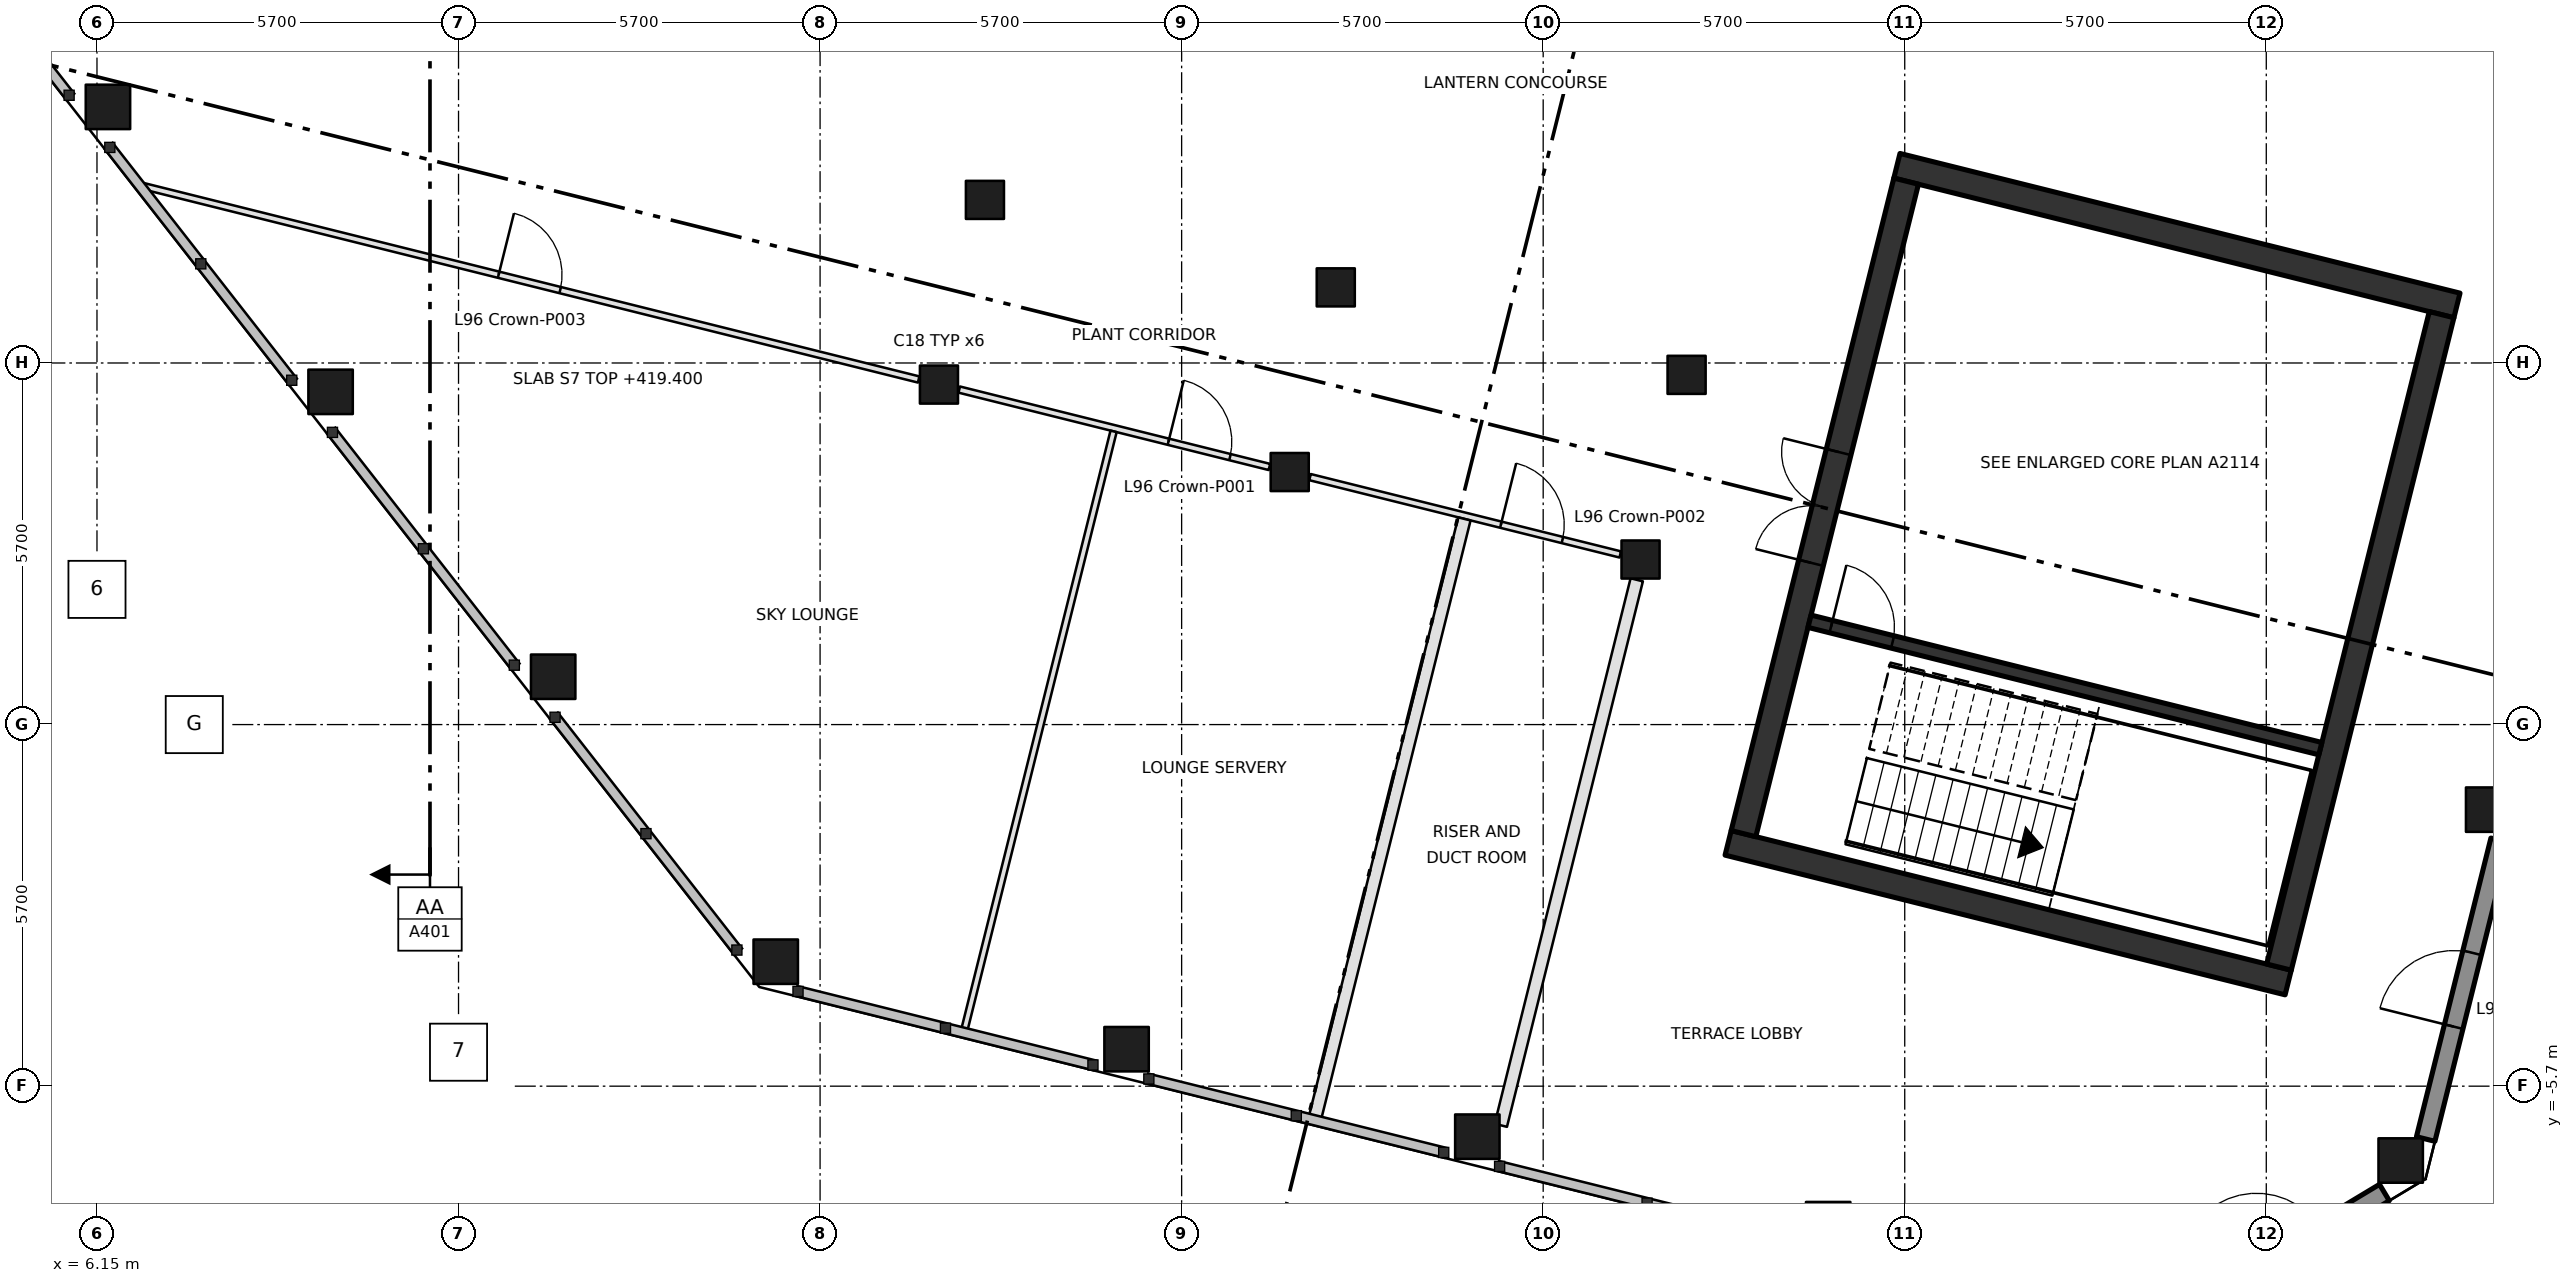
"""IFC4 building model, lengths in metres.
Left out: names, types, materials, properties, quantities, classifications, styles, units other than length and angle.
Written with IfcOpenShell. Run it as: python <this file> out.ifc"""

import sys

from ifc_helpers import new_model, si_unit, direction, frame, frame_2d, origin, origin_2d, place, context, subcontext, project, spatial, rectangle, extrude, element, fill, save


model = new_model("IFC4")
c1 = context("Model", 3, precision=1e-05, world=origin(), true_north=direction((0.0, 1.0)))
c2 = subcontext(c1, "Body", "Model", "MODEL_VIEW")
j1 = project(units=[si_unit("LENGTHUNIT", "METRE"), si_unit("PLANEANGLEUNIT", "RADIAN")], contexts=[c1])
p1 = place(None, origin())
s1 = spatial("IfcSite", under=j1, at=p1, CompositionType="ELEMENT")
p2 = place(p1, origin())
s2 = spatial("IfcBuilding", under=s1, at=p2, CompositionType="ELEMENT")
p3 = place(p2, frame((0.0, 0.0, 419.4)))
s3 = spatial("IfcBuildingStorey", under=s2, at=p3, CompositionType="ELEMENT", Elevation=419.4)
for number, where, z_axis, x_axis in (
    (1, (16.851, -3.738, 0.0), (0.0, 0.0, 1.0), (1.0, 0.0, 0.0)),
    (2, (13.342, 0.754, 0.0), (0.0, 0.0, 1.0), (1.0, 0.0, 0.0)),
    (3, (9.833, 5.245, 0.0), (0.0, 0.0, 1.0), (1.0, 0.0, 0.0)),
    (4, (6.323, 9.737, 0.0), (0.0, 0.0, 1.0), (1.0, 0.0, 0.0)),
    (5, (22.382, -5.117, 0.0), (0.0, 0.0, 1.0), (1.0, 0.0, 0.0)),
    (6, (27.912, -6.496, 0.0), (0.0, 0.0, 1.0), (1.0, 0.0, 0.0)),
    (7, (33.443, -7.875, 0.0), (0.0, 0.0, 1.0), (1.0, 0.0, 0.0)),
    (8, (42.469, -6.872, 0.0), (0.0, 0.0, 1.0), (1.0, 0.0, 0.0)),
    (9, (43.848, -1.341, 0.0), (0.0, 0.0, 1.0), (1.0, 0.0, 0.0)),
):
    element("IfcColumn", number, at=place(p3, frame(where, z_axis=z_axis, x_axis=x_axis)), inside=s3, PredefinedType="COLUMN", context=c2, shape_type="SweptSolid", body=[
        extrude(rectangle(XDim=0.7, YDim=0.7, at=origin_2d()), origin(), (0.0, 0.0, 1.0), 4.8),
    ])
for number, where, z_axis, x_axis in (
    (10, (19.424, 5.36, 0.0), (0.0, 0.0, 1.0), (1.0, 0.0, 0.0)),
    (11, (24.954, 3.981, 0.0), (0.0, 0.0, 1.0), (1.0, 0.0, 0.0)),
    (12, (30.485, 2.602, 0.0), (0.0, 0.0, 1.0), (1.0, 0.0, 0.0)),
    (13, (20.149, 8.271, 0.0), (0.0, 0.0, 1.0), (1.0, 0.0, 0.0)),
    (14, (25.68, 6.892, 0.0), (0.0, 0.0, 1.0), (1.0, 0.0, 0.0)),
    (15, (31.211, 5.513, 0.0), (0.0, 0.0, 1.0), (1.0, 0.0, 0.0)),
):
    element("IfcColumn", number, at=place(p3, frame(where, z_axis=z_axis, x_axis=x_axis)), inside=s3, PredefinedType="COLUMN", context=c2, shape_type="SweptSolid", body=[
        extrude(rectangle(XDim=0.6, YDim=0.6, at=origin_2d()), origin(), (0.0, 0.0, 1.0), 4.8),
    ])
p4 = place(p3, frame((31.866, -1.864, -0.45), z_axis=(0.0, 0.0, 1.0), x_axis=(0.970281225948, -0.241980045814, 0.0)))
e16 = element("IfcWall", 16, at=p4, inside=s3, PredefinedType="SHEAR", context=c2, shape_type="SweptSolid", body=[
    extrude(rectangle(XDim=9.1, YDim=0.4, at=frame_2d((4.55, 0.0))), origin(), (0.0, 0.0, 1.0), 4.95),
])
p5 = place(p3, frame((34.527, 8.809, -0.45), z_axis=(0.0, 0.0, 1.0), x_axis=(0.970273354879, -0.242011604707, 0.0)))
e17 = element("IfcWall", 17, at=p5, inside=s3, PredefinedType="SHEAR", context=c2, shape_type="SweptSolid", body=[
    extrude(rectangle(XDim=9.099, YDim=0.4, at=frame_2d((4.55, 0.0))), origin(), (0.0, 0.0, 1.0), 4.95),
])
p6 = place(p3, frame((32.108, -1.719, -0.45), z_axis=(0.0, 0.0, 1.0), x_axis=(0.241912337509, 0.970298109326, 0.0)))
e18 = element("IfcWall", 18, at=p6, inside=s3, PredefinedType="SHEAR", context=c2, shape_type="SweptSolid", body=[
    extrude(rectangle(XDim=10.6, YDim=0.4, at=frame_2d((5.3, 0.0))), origin(), (0.0, 0.0, 1.0), 4.95),
])
p7 = place(p6, frame((4.4, 0.0, 0.45)))
e19 = element("IfcOpeningElement", 19, at=p7, cuts=e18, PredefinedType="OPENING", context=c2, shape_type="SweptSolid", body=[
    extrude(rectangle(XDim=1.8, YDim=2.1, at=frame_2d((0.9, 1.05))), frame((0.0, 0.21, 0.0), z_axis=(0.0, -1.0, 0.0), x_axis=(1.0, 0.0, 0.0)), (0.0, 0.0, 1.0), 0.42),
])
p8 = place(p3, frame((40.55, -3.823, -0.45), z_axis=(0.0, 0.0, 1.0), x_axis=(0.241890652548, 0.970303515509, 0.0)))
e20 = element("IfcWall", 20, at=p8, inside=s3, PredefinedType="SHEAR", context=c2, shape_type="SweptSolid", body=[
    extrude(rectangle(XDim=10.6, YDim=0.4, at=frame_2d((5.3, 0.0))), origin(), (0.0, 0.0, 1.0), 4.95),
])
p9 = place(p3, frame((33.149, 1.629, 0.0), z_axis=(0.0, 0.0, 1.0), x_axis=(0.970296307498, -0.241919564434, 0.0)))
e21 = element("IfcWall", 21, at=p9, inside=s3, PredefinedType="SOLIDWALL", context=c2, shape_type="SweptSolid", body=[
    extrude(rectangle(XDim=8.3, YDim=0.2, at=frame_2d((4.15, 0.0))), origin(), (0.0, 0.0, 1.0), 4.5),
])
p10 = place(p9, frame((0.35, 0.0, 0.0)))
e22 = element("IfcOpeningElement", 22, at=p10, cuts=e21, PredefinedType="OPENING", context=c2, shape_type="SweptSolid", body=[
    extrude(rectangle(XDim=1.0, YDim=2.1, at=frame_2d((0.5, 1.05))), frame((0.0, 0.11, 0.0), z_axis=(0.0, -1.0, 0.0), x_axis=(1.0, 0.0, 0.0)), (0.0, 0.0, 1.0), 0.22),
])
p11 = place(p3, frame((6.82, 8.503, 0.0), z_axis=(0.0, 0.0, 1.0), x_axis=(0.970288651432, -0.241950269482, 0.0)))
e23 = element("IfcWall", 23, at=p11, inside=s3, PredefinedType="PARTITIONING", context=c2, shape_type="SweptSolid", body=[
    extrude(rectangle(XDim=12.661, YDim=0.1, at=frame_2d((6.33, 0.0))), origin(), (0.0, 0.0, 1.0), 4.5),
])
p12 = place(p11, frame((5.836, 0.0, 0.0)))
e24 = element("IfcOpeningElement", 24, at=p12, cuts=e23, PredefinedType="OPENING", context=c2, shape_type="SweptSolid", body=[
    extrude(rectangle(XDim=1.0, YDim=2.1, at=frame_2d((0.5, 1.05))), frame((0.0, 0.06, 0.0), z_axis=(0.0, -1.0, 0.0), x_axis=(1.0, 0.0, 0.0)), (0.0, 0.0, 1.0), 0.12),
])
p13 = place(p3, frame((19.744, 5.281, 0.0), z_axis=(0.0, 0.0, 1.0), x_axis=(0.970262058426, -0.242056889963, 0.0)))
e25 = element("IfcWall", 25, at=p13, inside=s3, PredefinedType="PARTITIONING", context=c2, shape_type="SweptSolid", body=[
    extrude(rectangle(XDim=5.04, YDim=0.1, at=frame_2d((2.52, 0.0))), origin(), (0.0, 0.0, 1.0), 4.5),
])
p14 = place(p13, frame((3.399, 0.0, 0.0)))
e26 = element("IfcOpeningElement", 26, at=p14, cuts=e25, PredefinedType="OPENING", context=c2, shape_type="SweptSolid", body=[
    extrude(rectangle(XDim=1.0, YDim=2.1, at=frame_2d((0.5, 1.05))), frame((0.0, 0.06, 0.0), z_axis=(0.0, -1.0, 0.0), x_axis=(1.0, 0.0, 0.0)), (0.0, 0.0, 1.0), 0.12),
])
p15 = place(p3, frame((25.274, 3.901, 0.0), z_axis=(0.0, 0.0, 1.0), x_axis=(0.970318883063, -0.241828999857, 0.0)))
e27 = element("IfcWall", 27, at=p15, inside=s3, PredefinedType="PARTITIONING", context=c2, shape_type="SweptSolid", body=[
    extrude(rectangle(XDim=5.041, YDim=0.1, at=frame_2d((2.521, 0.0))), origin(), (0.0, 0.0, 1.0), 4.5),
])
p16 = place(p15, frame((3.101, 0.0, 0.0)))
e28 = element("IfcOpeningElement", 28, at=p16, cuts=e27, PredefinedType="OPENING", context=c2, shape_type="SweptSolid", body=[
    extrude(rectangle(XDim=1.0, YDim=2.1, at=frame_2d((0.5, 1.05))), frame((0.0, 0.06, 0.0), z_axis=(0.0, -1.0, 0.0), x_axis=(1.0, 0.0, 0.0)), (0.0, 0.0, 1.0), 0.12),
])
p17 = place(p3, frame((30.425, 2.282, 0.0), z_axis=(0.0, 0.0, 1.0), x_axis=(-0.241828998562, -0.970318883385, 0.0)))
e29 = element("IfcWall", 29, at=p17, inside=s3, PredefinedType="PARTITIONING", context=c2, shape_type="SweptSolid", body=[
    extrude(rectangle(XDim=8.862, YDim=0.2, at=frame_2d((4.431, 0.0))), origin(), (0.0, 0.0, 1.0), 4.5),
])
p18 = place(p3, frame((19.812, -4.863, 0.0), z_axis=(0.0, 0.0, 1.0), x_axis=(0.241900932466, 0.970300952732, 0.0)))
e30 = element("IfcWall", 30, at=p18, inside=s3, PredefinedType="PARTITIONING", context=c2, shape_type="SweptSolid", body=[
    extrude(rectangle(XDim=9.776, YDim=0.1, at=frame_2d((4.888, 0.0))), origin(), (0.0, 0.0, 1.0), 4.5),
])
p19 = place(p3, frame((25.342, -6.242, 0.0), z_axis=(0.0, 0.0, 1.0), x_axis=(0.242024303443, 0.970270187393, 0.0)))
e31 = element("IfcWall", 31, at=p19, inside=s3, PredefinedType="PARTITIONING", context=c2, shape_type="SweptSolid", body=[
    extrude(rectangle(XDim=9.775, YDim=0.2, at=frame_2d((4.887, 0.0))), origin(), (0.0, 0.0, 1.0), 4.5),
])
p20 = place(p3, frame((39.209, -9.181, 0.0), z_axis=(0.0, 0.0, 1.0), x_axis=(0.857216082003, 0.514956880481, 0.0)))
e32 = element("IfcWall", 32, at=p20, inside=s3, PredefinedType="SOLIDWALL", context=c2, shape_type="SweptSolid", body=[
    extrude(rectangle(XDim=3.503, YDim=0.3, at=frame_2d((1.751, 0.0))), origin(), (0.0, 0.0, 1.0), 3.85),
])
p21 = place(p20, frame((1.152, 0.0, 0.0)))
e33 = element("IfcOpeningElement", 33, at=p21, cuts=e32, PredefinedType="OPENING", context=c2, shape_type="SweptSolid", body=[
    extrude(rectangle(XDim=1.2, YDim=2.4, at=frame_2d((0.6, 1.2))), frame((0.0, 0.16, 0.0), z_axis=(0.0, -1.0, 0.0), x_axis=(1.0, 0.0, 0.0)), (0.0, 0.0, 1.0), 0.32),
])
p22 = place(p3, frame((42.863, -6.533, 0.0), z_axis=(0.0, 0.0, 1.0), x_axis=(0.241967314076, 0.970284401049, 0.0)))
e34 = element("IfcWall", 34, at=p22, inside=s3, PredefinedType="SOLIDWALL", context=c2, shape_type="SweptSolid", body=[
    extrude(rectangle(XDim=4.852, YDim=0.3, at=frame_2d((2.426, 0.0))), origin(), (0.0, 0.0, 1.0), 3.85),
])
p23 = place(p22, frame((1.826, 0.0, 0.0)))
e35 = element("IfcOpeningElement", 35, at=p23, cuts=e34, PredefinedType="OPENING", context=c2, shape_type="SweptSolid", body=[
    extrude(rectangle(XDim=1.2, YDim=2.4, at=frame_2d((0.6, 1.2))), frame((0.0, 0.16, 0.0), z_axis=(0.0, -1.0, 0.0), x_axis=(1.0, 0.0, 0.0)), (0.0, 0.0, 1.0), 0.32),
])
p24 = place(p10, origin())
e36 = element("IfcDoor", 36, at=p24, inside=s3, OperationType="SINGLE_SWING_LEFT", PredefinedType="DOOR", context=c2, shape_type="SweptSolid", body=[
    extrude(rectangle(XDim=1.0, YDim=2.1, at=frame_2d((0.5, 1.05))), frame((0.0, 0.025, 0.0), z_axis=(0.0, -1.0, 0.0), x_axis=(1.0, 0.0, 0.0)), (0.0, 0.0, 1.0), 0.05),
])
fill(e22, e36)
p25 = place(p7, origin())
e37 = element("IfcDoor", 37, at=p25, inside=s3, OperationType="DOUBLE_DOOR_SINGLE_SWING", PredefinedType="DOOR", context=c2, shape_type="SweptSolid", body=[
    extrude(rectangle(XDim=1.8, YDim=2.1, at=frame_2d((0.9, 1.05))), frame((0.0, 0.025, 0.0), z_axis=(0.0, -1.0, 0.0), x_axis=(1.0, 0.0, 0.0)), (0.0, 0.0, 1.0), 0.05),
])
fill(e19, e37)
p26 = place(p14, origin())
e38 = element("IfcDoor", 38, at=p26, inside=s3, OperationType="SINGLE_SWING_LEFT", PredefinedType="DOOR", context=c2, shape_type="SweptSolid", body=[
    extrude(rectangle(XDim=1.0, YDim=2.1, at=frame_2d((0.5, 1.05))), frame((0.0, 0.025, 0.0), z_axis=(0.0, -1.0, 0.0), x_axis=(1.0, 0.0, 0.0)), (0.0, 0.0, 1.0), 0.05),
])
fill(e26, e38)
p27 = place(p16, origin())
e39 = element("IfcDoor", 39, at=p27, inside=s3, OperationType="SINGLE_SWING_LEFT", PredefinedType="DOOR", context=c2, shape_type="SweptSolid", body=[
    extrude(rectangle(XDim=1.0, YDim=2.1, at=frame_2d((0.5, 1.05))), frame((0.0, 0.025, 0.0), z_axis=(0.0, -1.0, 0.0), x_axis=(1.0, 0.0, 0.0)), (0.0, 0.0, 1.0), 0.05),
])
fill(e28, e39)
p28 = place(p12, origin())
e40 = element("IfcDoor", 40, at=p28, inside=s3, OperationType="SINGLE_SWING_LEFT", PredefinedType="DOOR", context=c2, shape_type="SweptSolid", body=[
    extrude(rectangle(XDim=1.0, YDim=2.1, at=frame_2d((0.5, 1.05))), frame((0.0, 0.025, 0.0), z_axis=(0.0, -1.0, 0.0), x_axis=(1.0, 0.0, 0.0)), (0.0, 0.0, 1.0), 0.05),
])
fill(e24, e40)
p29 = place(p23, origin())
e41 = element("IfcDoor", 41, at=p29, inside=s3, OperationType="SINGLE_SWING_LEFT", PredefinedType="DOOR", context=c2, shape_type="SweptSolid", body=[
    extrude(rectangle(XDim=1.2, YDim=2.4, at=frame_2d((0.6, 1.2))), frame((0.0, 0.025, 0.0), z_axis=(0.0, -1.0, 0.0), x_axis=(1.0, 0.0, 0.0)), (0.0, 0.0, 1.0), 0.05),
])
fill(e35, e41)
save(model, sys.argv[1])
